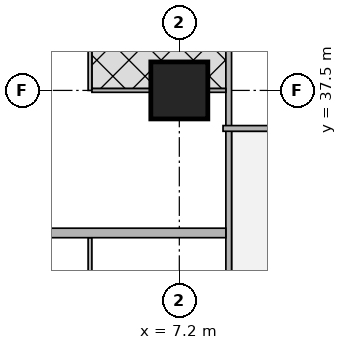
"""IFC4 building model, lengths in metres.
Left out: names, types, materials, properties, quantities, classifications, styles, units other than length and angle.
Written with IfcOpenShell. Run it as: python <this file> out.ifc"""

import sys

from ifc_helpers import new_model, si_unit, direction, frame, frame_2d, origin, origin_2d, place, context, subcontext, project, spatial, rectangle, extrude, element, fill, save


model = new_model("IFC4")
c1 = context("Model", 3, precision=1e-05, world=origin(), true_north=direction((0.0, 1.0)))
c2 = subcontext(c1, "Body", "Model", "MODEL_VIEW")
j1 = project(units=[si_unit("LENGTHUNIT", "METRE"), si_unit("PLANEANGLEUNIT", "RADIAN")], contexts=[c1])
p1 = place(None, origin())
s1 = spatial("IfcSite", under=j1, at=p1, CompositionType="ELEMENT")
p2 = place(p1, origin())
s2 = spatial("IfcBuilding", under=s1, at=p2, CompositionType="ELEMENT")
p3 = place(p2, frame((0.0, 0.0, 139.55)))
s3 = spatial("IfcBuildingStorey", under=s2, at=p3, CompositionType="ELEMENT", Elevation=139.55)
p4 = place(p3, frame((7.2, 37.5, 0.0), z_axis=(0.0, 0.0, 1.0), x_axis=(1.0, 0.0, 0.0)))
e1 = element("IfcColumn", 1, at=p4, inside=s3, PredefinedType="COLUMN", context=c2, shape_type="SweptSolid", body=[
    extrude(rectangle(XDim=1.5, YDim=1.5, at=origin_2d()), origin(), (0.0, 0.0, 1.0), 3.75),
])
p5 = place(p3, frame((8.5, 1.964, 0.0), z_axis=(0.0, 0.0, 1.0), x_axis=(0.0, 1.0, 0.0)))
e2 = element("IfcWall", 2, at=p5, inside=s3, PredefinedType="SOLIDWALL", context=c2, shape_type="SweptSolid", body=[
    extrude(rectangle(XDim=41.097, YDim=0.15, at=frame_2d((20.548, 0.0))), origin(), (0.0, 0.0, 1.0), 3.5),
])
p6 = place(p5, frame((6.911, 0.0, 0.0)))
e3 = element("IfcOpeningElement", 3, at=p6, cuts=e2, PredefinedType="OPENING", context=c2, shape_type="SweptSolid", body=[
    extrude(rectangle(XDim=1.0, YDim=2.1, at=frame_2d((0.5, 1.05))), frame((0.0, 0.085, 0.0), z_axis=(0.0, -1.0, 0.0), x_axis=(1.0, 0.0, 0.0)), (0.0, 0.0, 1.0), 0.17),
])
p7 = place(p5, frame((10.661, 0.0, 0.0)))
e4 = element("IfcOpeningElement", 4, at=p7, cuts=e2, PredefinedType="OPENING", context=c2, shape_type="SweptSolid", body=[
    extrude(rectangle(XDim=1.0, YDim=2.1, at=frame_2d((0.5, 1.05))), frame((0.0, 0.085, 0.0), z_axis=(0.0, -1.0, 0.0), x_axis=(1.0, 0.0, 0.0)), (0.0, 0.0, 1.0), 0.17),
])
p8 = place(p5, frame((25.661, 0.0, 0.0)))
e5 = element("IfcOpeningElement", 5, at=p8, cuts=e2, PredefinedType="OPENING", context=c2, shape_type="SweptSolid", body=[
    extrude(rectangle(XDim=1.0, YDim=2.1, at=frame_2d((0.5, 1.05))), frame((0.0, 0.085, 0.0), z_axis=(0.0, -1.0, 0.0), x_axis=(1.0, 0.0, 0.0)), (0.0, 0.0, 1.0), 0.17),
])
p9 = place(p5, frame((33.161, 0.0, 0.0)))
e6 = element("IfcOpeningElement", 6, at=p9, cuts=e2, PredefinedType="OPENING", context=c2, shape_type="SweptSolid", body=[
    extrude(rectangle(XDim=1.0, YDim=2.1, at=frame_2d((0.5, 1.05))), frame((0.0, 0.085, 0.0), z_axis=(0.0, -1.0, 0.0), x_axis=(1.0, 0.0, 0.0)), (0.0, 0.0, 1.0), 0.17),
])
p10 = place(p3, frame((8.35, 36.5, 0.0), z_axis=(0.0, 0.0, 1.0), x_axis=(1.0, 0.0, 0.0)))
e7 = element("IfcWall", 7, at=p10, inside=s3, PredefinedType="SOLIDWALL", context=c2, shape_type="SweptSolid", body=[
    extrude(rectangle(XDim=26.415, YDim=0.15, at=frame_2d((13.208, 0.0))), origin(), (0.0, 0.0, 1.0), 3.5),
])
p11 = place(p10, frame((2.6, 0.0, 0.0)))
e8 = element("IfcOpeningElement", 8, at=p11, cuts=e7, PredefinedType="OPENING", context=c2, shape_type="SweptSolid", body=[
    extrude(rectangle(XDim=1.0, YDim=2.1, at=frame_2d((0.5, 1.05))), frame((0.0, 0.085, 0.0), z_axis=(0.0, -1.0, 0.0), x_axis=(1.0, 0.0, 0.0)), (0.0, 0.0, 1.0), 0.17),
])
p12 = place(p10, frame((10.75, 0.0, 0.0)))
e9 = element("IfcOpeningElement", 9, at=p12, cuts=e7, PredefinedType="OPENING", context=c2, shape_type="SweptSolid", body=[
    extrude(rectangle(XDim=1.0, YDim=2.1, at=frame_2d((0.5, 1.05))), frame((0.0, 0.085, 0.0), z_axis=(0.0, -1.0, 0.0), x_axis=(1.0, 0.0, 0.0)), (0.0, 0.0, 1.0), 0.17),
])
p13 = place(p3, frame((4.85, 30.0, 0.0), z_axis=(0.0, 0.0, 1.0), x_axis=(0.0, 1.0, 0.0)))
e10 = element("IfcWall", 10, at=p13, inside=s3, PredefinedType="PARTITIONING", context=c2, shape_type="SweptSolid", body=[
    extrude(rectangle(XDim=3.625, YDim=0.1, at=frame_2d((1.812, 0.0))), origin(), (0.0, 0.0, 1.0), 3.5),
])
p14 = place(p13, frame((0.575, 0.0, 0.0)))
e11 = element("IfcOpeningElement", 11, at=p14, cuts=e10, PredefinedType="OPENING", context=c2, shape_type="SweptSolid", body=[
    extrude(rectangle(XDim=0.9, YDim=2.1, at=frame_2d((0.45, 1.05))), frame((0.0, 0.06, 0.0), z_axis=(0.0, -1.0, 0.0), x_axis=(1.0, 0.0, 0.0)), (0.0, 0.0, 1.0), 0.12),
])
p15 = place(p13, frame((2.45, 0.0, 0.0)))
e12 = element("IfcOpeningElement", 12, at=p15, cuts=e10, PredefinedType="OPENING", context=c2, shape_type="SweptSolid", body=[
    extrude(rectangle(XDim=0.9, YDim=2.1, at=frame_2d((0.45, 1.05))), frame((0.0, 0.06, 0.0), z_axis=(0.0, -1.0, 0.0), x_axis=(1.0, 0.0, 0.0)), (0.0, 0.0, 1.0), 0.12),
])
p16 = place(p3, frame((4.85, 37.5, 0.0), z_axis=(0.0, 0.0, 1.0), x_axis=(0.0, 1.0, 0.0)))
e13 = element("IfcWall", 13, at=p16, inside=s3, PredefinedType="PARTITIONING", context=c2, shape_type="SweptSolid", body=[
    extrude(rectangle(XDim=5.007, YDim=0.1, at=frame_2d((2.503, 0.0))), origin(), (0.0, 0.0, 1.0), 3.5),
])
p17 = place(p16, frame((0.575, 0.0, 0.0)))
e14 = element("IfcOpeningElement", 14, at=p17, cuts=e13, PredefinedType="OPENING", context=c2, shape_type="SweptSolid", body=[
    extrude(rectangle(XDim=0.9, YDim=2.1, at=frame_2d((0.45, 1.05))), frame((0.0, 0.06, 0.0), z_axis=(0.0, -1.0, 0.0), x_axis=(1.0, 0.0, 0.0)), (0.0, 0.0, 1.0), 0.12),
])
p18 = place(p16, frame((2.45, 0.0, 0.0)))
e15 = element("IfcOpeningElement", 15, at=p18, cuts=e13, PredefinedType="OPENING", context=c2, shape_type="SweptSolid", body=[
    extrude(rectangle(XDim=0.9, YDim=2.1, at=frame_2d((0.45, 1.05))), frame((0.0, 0.06, 0.0), z_axis=(0.0, -1.0, 0.0), x_axis=(1.0, 0.0, 0.0)), (0.0, 0.0, 1.0), 0.12),
])
p19 = place(p3, frame((4.9, 37.5, 0.0), z_axis=(0.0, 0.0, 1.0), x_axis=(1.0, 0.0, 0.0)))
e16 = element("IfcWall", 16, at=p19, inside=s3, PredefinedType="PARTITIONING", context=c2, shape_type="SweptSolid", body=[
    extrude(rectangle(XDim=1.549, YDim=0.1, at=frame_2d((0.774, 0.0))), origin(), (0.0, 0.0, 1.0), 3.5),
])
p20 = place(p3, frame((7.951, 37.5, 0.0), z_axis=(0.0, 0.0, 1.0), x_axis=(1.0, 0.0, 0.0)))
e17 = element("IfcWall", 17, at=p20, inside=s3, PredefinedType="PARTITIONING", context=c2, shape_type="SweptSolid", body=[
    extrude(rectangle(XDim=0.474, YDim=0.1, at=frame_2d((0.237, 0.0))), origin(), (0.0, 0.0, 1.0), 3.5),
])
p21 = place(p3, frame((3.65, 33.75, 0.0), z_axis=(0.0, 0.0, 1.0), x_axis=(1.0, 0.0, 0.0)))
e18 = element("IfcWall", 18, at=p21, inside=s3, PredefinedType="SOLIDWALL", context=c2, shape_type="SweptSolid", body=[
    extrude(rectangle(XDim=4.775, YDim=0.25, at=frame_2d((2.388, 0.0))), origin(), (0.0, 0.0, 1.0), 3.5),
])
p22 = place(p15, origin())
e19 = element("IfcDoor", 19, at=p22, inside=s3, OperationType="SINGLE_SWING_LEFT", PredefinedType="DOOR", context=c2, shape_type="SweptSolid", body=[
    extrude(rectangle(XDim=0.9, YDim=2.1, at=frame_2d((0.45, 1.05))), frame((0.0, 0.025, 0.0), z_axis=(0.0, -1.0, 0.0), x_axis=(1.0, 0.0, 0.0)), (0.0, 0.0, 1.0), 0.05),
])
fill(e12, e19)
p23 = place(p17, origin())
e20 = element("IfcDoor", 20, at=p23, inside=s3, OperationType="SINGLE_SWING_RIGHT", PredefinedType="DOOR", context=c2, shape_type="SweptSolid", body=[
    extrude(rectangle(XDim=0.9, YDim=2.1, at=frame_2d((0.45, 1.05))), frame((0.0, 0.025, 0.0), z_axis=(0.0, -1.0, 0.0), x_axis=(1.0, 0.0, 0.0)), (0.0, 0.0, 1.0), 0.05),
])
fill(e14, e20)
p24 = place(p9, origin())
e21 = element("IfcDoor", 21, at=p24, inside=s3, OperationType="SINGLE_SWING_RIGHT", PredefinedType="DOOR", context=c2, shape_type="SweptSolid", body=[
    extrude(rectangle(XDim=1.0, YDim=2.1, at=frame_2d((0.5, 1.05))), frame((0.0, 0.025, 0.0), z_axis=(0.0, -1.0, 0.0), x_axis=(1.0, 0.0, 0.0)), (0.0, 0.0, 1.0), 0.05),
])
fill(e6, e21)
save(model, sys.argv[1])
